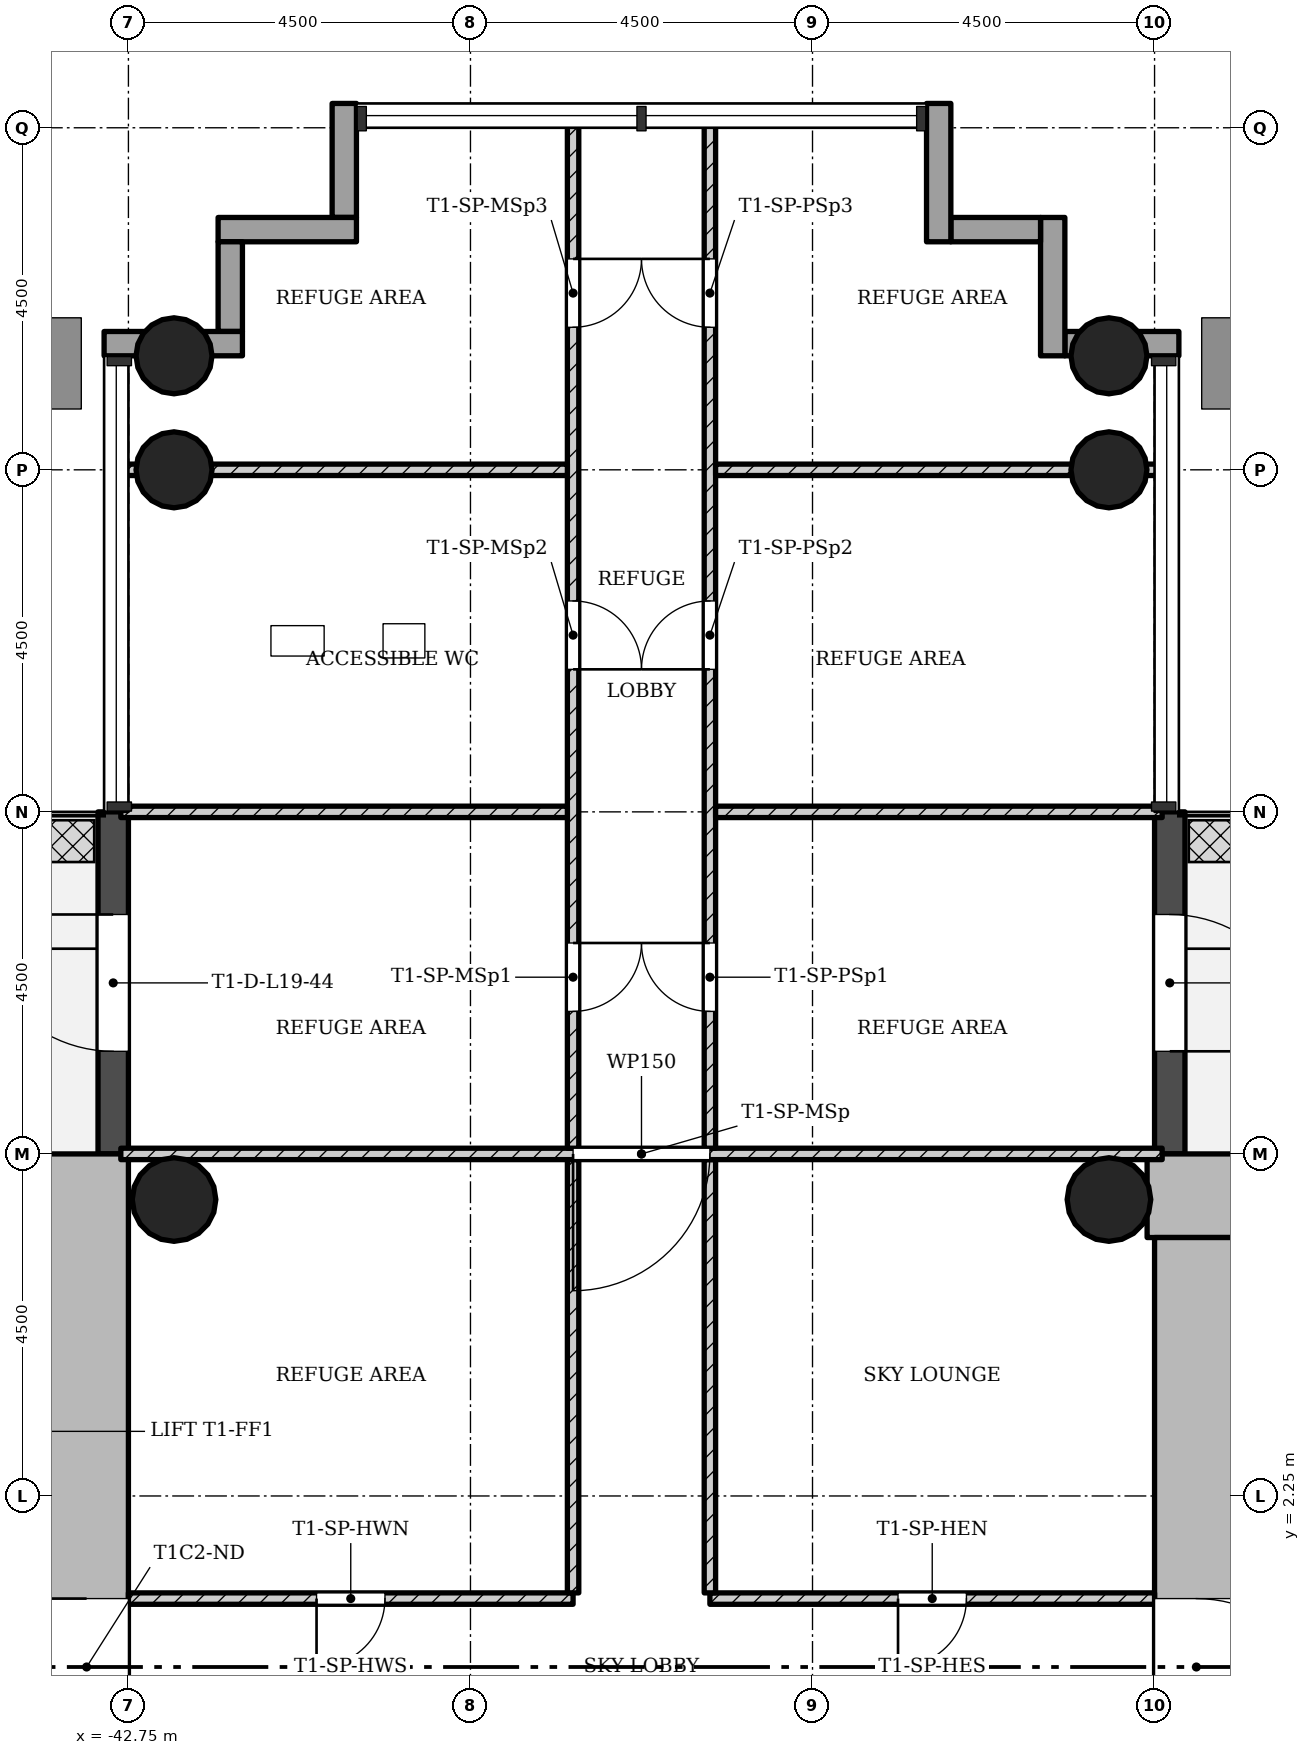
"""IFC4 building model, lengths in metres.
Left out: names, types, materials, properties, quantities, classifications, styles, units other than length and angle.
Written with IfcOpenShell. Run it as: python <this file> out.ifc"""

import sys

from ifc_helpers import new_model, si_unit, direction, frame, frame_2d, origin, origin_2d, place, context, subcontext, project, spatial, rectangle, hollow_circle, extrude, element, fill, save


model = new_model("IFC4")
c1 = context("Model", 3, precision=1e-05, world=origin(), true_north=direction((0.0, 1.0)))
c2 = subcontext(c1, "Body", "Model", "MODEL_VIEW")
j1 = project(units=[si_unit("LENGTHUNIT", "METRE"), si_unit("PLANEANGLEUNIT", "RADIAN")], contexts=[c1])
p1 = place(None, origin())
s1 = spatial("IfcSite", under=j1, at=p1, CompositionType="ELEMENT")
p2 = place(p1, origin())
s2 = spatial("IfcBuilding", under=s1, at=p2, CompositionType="ELEMENT")
p3 = place(p2, frame((0.0, 0.0, 72.1)))
s3 = spatial("IfcBuildingStorey", under=s2, at=p3, CompositionType="ELEMENT", Elevation=72.1)
p4 = place(p3, frame((-21.35, 6.2, 0.0), z_axis=(0.0, 0.0, 1.0), x_axis=(-1.0, 0.0, 0.0)))
e1 = element("IfcWall", 1, at=p4, inside=s3, PredefinedType="SHEAR", context=c2, shape_type="SweptSolid", body=[
    extrude(rectangle(XDim=7.998, YDim=1.1, at=frame_2d((3.999, 0.0))), origin(), (0.0, 0.0, 1.0), 4.5),
])
p5 = place(p3, frame((-28.7, 5.65, 0.0), z_axis=(0.0, 0.0, 1.0), x_axis=(0.0, -1.0, 0.0)))
e2 = element("IfcWall", 2, at=p5, inside=s3, PredefinedType="SHEAR", context=c2, shape_type="SweptSolid", body=[
    extrude(rectangle(XDim=12.4, YDim=1.1, at=frame_2d((6.2, 0.0))), origin(), (0.0, 0.0, 1.0), 4.5),
])
p6 = place(p5, frame((4.75, 0.0, 0.0)))
e3 = element("IfcOpeningElement", 3, at=p6, cuts=e2, PredefinedType="OPENING", context=c2, shape_type="SweptSolid", body=[
    extrude(rectangle(XDim=1.8, YDim=2.1, at=frame_2d((0.9, 1.05))), frame((0.0, 0.56, 0.0), z_axis=(0.0, -1.0, 0.0), x_axis=(1.0, 0.0, 0.0)), (0.0, 0.0, 1.0), 1.12),
])
p7 = place(p3, frame((-43.3, -5.65, 0.0), z_axis=(0.0, 0.0, 1.0), x_axis=(0.0, 1.0, 0.0)))
e4 = element("IfcWall", 4, at=p7, inside=s3, PredefinedType="SHEAR", context=c2, shape_type="SweptSolid", body=[
    extrude(rectangle(XDim=12.4, YDim=1.1, at=frame_2d((6.2, 0.0))), origin(), (0.0, 0.0, 1.0), 4.5),
])
p8 = place(p7, frame((4.75, 0.0, 0.0)))
e5 = element("IfcOpeningElement", 5, at=p8, cuts=e4, PredefinedType="OPENING", context=c2, shape_type="SweptSolid", body=[
    extrude(rectangle(XDim=1.8, YDim=2.1, at=frame_2d((0.9, 1.05))), frame((0.0, 0.56, 0.0), z_axis=(0.0, -1.0, 0.0), x_axis=(1.0, 0.0, 0.0)), (0.0, 0.0, 1.0), 1.12),
])
for number, where, z_axis, x_axis in (
    (6, (-29.85, 15.75, 0.0), (0.0, 0.0, 1.0), (1.0, 0.0, 0.0)),
    (7, (-42.15, 15.75, 0.0), (0.0, 0.0, 1.0), (1.0, 0.0, 0.0)),
    (8, (-29.85, 17.25, 0.0), (0.0, 0.0, 1.0), (1.0, 0.0, 0.0)),
    (9, (-42.15, 17.25, 0.0), (0.0, 0.0, 1.0), (1.0, 0.0, 0.0)),
):
    element("IfcColumn", number, at=place(p3, frame(where, z_axis=z_axis, x_axis=x_axis)), inside=s3, PredefinedType="COLUMN", context=c2, shape_type="SweptSolid", body=[
        extrude(hollow_circle(Radius=0.5, WallThickness=0.036, at=origin_2d()), origin(), (0.0, 0.0, 1.0), 4.5),
    ])
for number, where, z_axis, x_axis in (
    (10, (-29.85, 6.15, 0.0), (0.0, 0.0, 1.0), (1.0, 0.0, 0.0)),
    (11, (-42.15, 6.15, 0.0), (0.0, 0.0, 1.0), (1.0, 0.0, 0.0)),
):
    element("IfcColumn", number, at=place(p3, frame(where, z_axis=z_axis, x_axis=x_axis)), inside=s3, PredefinedType="COLUMN", context=c2, shape_type="SweptSolid", body=[
        extrude(hollow_circle(Radius=0.55, WallThickness=0.04, at=origin_2d()), origin(), (0.0, 0.0, 1.0), 4.5),
    ])
p9 = place(p3, frame((-29.05, 6.75, -0.02), z_axis=(0.0, 0.0, 1.0), x_axis=(0.0, 1.0, 0.0)))
e12 = element("IfcWall", 12, at=p9, inside=s3, PredefinedType="STANDARD", context=c2, shape_type="SweptSolid", body=[
    extrude(rectangle(XDim=4.5, YDim=0.4, at=frame_2d((2.25, 0.0))), origin(), (0.0, 0.0, 1.0), 4.22),
])
p10 = place(p9, frame((1.35, 0.0, 0.02)))
e13 = element("IfcOpeningElement", 13, at=p10, cuts=e12, PredefinedType="OPENING", context=c2, shape_type="SweptSolid", body=[
    extrude(rectangle(XDim=1.8, YDim=2.1, at=frame_2d((0.9, 1.05))), frame((0.0, 0.21, 0.0), z_axis=(0.0, -1.0, 0.0), x_axis=(1.0, 0.0, 0.0)), (0.0, 0.0, 1.0), 0.42),
])
p11 = place(p3, frame((-28.93, 17.41, -0.3), z_axis=(0.0, 0.0, 1.0), x_axis=(-1.0, 0.0, 0.0)))
e14 = element("IfcWall", 14, at=p11, inside=s3, PredefinedType="STANDARD", context=c2, shape_type="SweptSolid", body=[
    extrude(rectangle(XDim=1.5, YDim=0.32, at=frame_2d((0.75, 0.0))), origin(), (0.0, 0.0, 1.0), 4.5),
])
p12 = place(p3, frame((-30.59, 17.25, -0.3), z_axis=(0.0, 0.0, 1.0), x_axis=(0.0, 1.0, 0.0)))
e15 = element("IfcWall", 15, at=p12, inside=s3, PredefinedType="STANDARD", context=c2, shape_type="SweptSolid", body=[
    extrude(rectangle(XDim=1.82, YDim=0.32, at=frame_2d((0.91, 0.0))), origin(), (0.0, 0.0, 1.0), 4.5),
])
p13 = place(p3, frame((-30.75, 18.91, -0.3), z_axis=(0.0, 0.0, 1.0), x_axis=(-1.0, 0.0, 0.0)))
e16 = element("IfcWall", 16, at=p13, inside=s3, PredefinedType="STANDARD", context=c2, shape_type="SweptSolid", body=[
    extrude(rectangle(XDim=1.18, YDim=0.32, at=frame_2d((0.59, 0.0))), origin(), (0.0, 0.0, 1.0), 4.5),
])
p14 = place(p3, frame((-32.09, 18.75, -0.3), z_axis=(0.0, 0.0, 1.0), x_axis=(0.0, 1.0, 0.0)))
e17 = element("IfcWall", 17, at=p14, inside=s3, PredefinedType="STANDARD", context=c2, shape_type="SweptSolid", body=[
    extrude(rectangle(XDim=1.82, YDim=0.32, at=frame_2d((0.91, 0.0))), origin(), (0.0, 0.0, 1.0), 4.5),
])
p15 = place(p3, frame((-39.91, 20.57, -0.3), z_axis=(0.0, 0.0, 1.0), x_axis=(0.0, -1.0, 0.0)))
e18 = element("IfcWall", 18, at=p15, inside=s3, PredefinedType="STANDARD", context=c2, shape_type="SweptSolid", body=[
    extrude(rectangle(XDim=1.5, YDim=0.32, at=frame_2d((0.75, 0.0))), origin(), (0.0, 0.0, 1.0), 4.5),
])
p16 = place(p3, frame((-39.75, 18.91, -0.3), z_axis=(0.0, 0.0, 1.0), x_axis=(-1.0, 0.0, 0.0)))
e19 = element("IfcWall", 19, at=p16, inside=s3, PredefinedType="STANDARD", context=c2, shape_type="SweptSolid", body=[
    extrude(rectangle(XDim=1.82, YDim=0.32, at=frame_2d((0.91, 0.0))), origin(), (0.0, 0.0, 1.0), 4.5),
])
p17 = place(p3, frame((-41.41, 18.75, -0.3), z_axis=(0.0, 0.0, 1.0), x_axis=(0.0, -1.0, 0.0)))
e20 = element("IfcWall", 20, at=p17, inside=s3, PredefinedType="STANDARD", context=c2, shape_type="SweptSolid", body=[
    extrude(rectangle(XDim=1.18, YDim=0.32, at=frame_2d((0.59, 0.0))), origin(), (0.0, 0.0, 1.0), 4.5),
])
p18 = place(p3, frame((-41.25, 17.41, -0.3), z_axis=(0.0, 0.0, 1.0), x_axis=(-1.0, 0.0, 0.0)))
e21 = element("IfcWall", 21, at=p18, inside=s3, PredefinedType="STANDARD", context=c2, shape_type="SweptSolid", body=[
    extrude(rectangle(XDim=1.82, YDim=0.32, at=frame_2d((0.91, 0.0))), origin(), (0.0, 0.0, 1.0), 4.5),
])
p19 = place(p3, frame((-42.95, 11.25, -0.02), z_axis=(0.0, 0.0, 1.0), x_axis=(0.0, -1.0, 0.0)))
e22 = element("IfcWall", 22, at=p19, inside=s3, PredefinedType="STANDARD", context=c2, shape_type="SweptSolid", body=[
    extrude(rectangle(XDim=4.5, YDim=0.4, at=frame_2d((2.25, 0.0))), origin(), (0.0, 0.0, 1.0), 4.22),
])
p20 = place(p19, frame((1.35, 0.0, 0.02)))
e23 = element("IfcOpeningElement", 23, at=p20, cuts=e22, PredefinedType="OPENING", context=c2, shape_type="SweptSolid", body=[
    extrude(rectangle(XDim=1.8, YDim=2.1, at=frame_2d((0.9, 1.05))), frame((0.0, 0.21, 0.0), z_axis=(0.0, -1.0, 0.0), x_axis=(1.0, 0.0, 0.0)), (0.0, 0.0, 1.0), 0.42),
])
p21 = place(p3, frame((-35.1, 0.9, 0.0), z_axis=(0.0, 0.0, 1.0), x_axis=(1.0, 0.0, 0.0)))
e24 = element("IfcWall", 24, at=p21, inside=s3, PredefinedType="PARTITIONING", context=c2, shape_type="SweptSolid", body=[
    extrude(rectangle(XDim=5.85, YDim=0.15, at=frame_2d((2.925, 0.0))), origin(), (0.0, 0.0, 1.0), 4.08),
])
p22 = place(p21, frame((2.475, 0.0, 0.0)))
e25 = element("IfcOpeningElement", 25, at=p22, cuts=e24, PredefinedType="OPENING", context=c2, shape_type="SweptSolid", body=[
    extrude(rectangle(XDim=0.9, YDim=2.1, at=frame_2d((0.45, 1.05))), frame((0.0, 0.085, 0.0), z_axis=(0.0, -1.0, 0.0), x_axis=(1.0, 0.0, 0.0)), (0.0, 0.0, 1.0), 0.17),
])
p23 = place(p3, frame((-35.1, 0.975, 0.0), z_axis=(0.0, 0.0, 1.0), x_axis=(0.0, 1.0, 0.0)))
e26 = element("IfcWall", 26, at=p23, inside=s3, PredefinedType="PARTITIONING", context=c2, shape_type="SweptSolid", body=[
    extrude(rectangle(XDim=5.7, YDim=0.15, at=frame_2d((2.85, 0.0))), origin(), (0.0, 0.0, 1.0), 4.08),
])
p24 = place(p3, frame((-42.75, 0.9, 0.0), z_axis=(0.0, 0.0, 1.0), x_axis=(1.0, 0.0, 0.0)))
e27 = element("IfcWall", 27, at=p24, inside=s3, PredefinedType="PARTITIONING", context=c2, shape_type="SweptSolid", body=[
    extrude(rectangle(XDim=5.85, YDim=0.15, at=frame_2d((2.925, 0.0))), origin(), (0.0, 0.0, 1.0), 4.08),
])
p25 = place(p24, frame((2.475, 0.0, 0.0)))
e28 = element("IfcOpeningElement", 28, at=p25, cuts=e27, PredefinedType="OPENING", context=c2, shape_type="SweptSolid", body=[
    extrude(rectangle(XDim=0.9, YDim=2.1, at=frame_2d((0.45, 1.05))), frame((0.0, 0.085, 0.0), z_axis=(0.0, -1.0, 0.0), x_axis=(1.0, 0.0, 0.0)), (0.0, 0.0, 1.0), 0.17),
])
p26 = place(p3, frame((-36.9, 0.975, 0.0), z_axis=(0.0, 0.0, 1.0), x_axis=(0.0, 1.0, 0.0)))
e29 = element("IfcWall", 29, at=p26, inside=s3, PredefinedType="PARTITIONING", context=c2, shape_type="SweptSolid", body=[
    extrude(rectangle(XDim=5.7, YDim=0.15, at=frame_2d((2.85, 0.0))), origin(), (0.0, 0.0, 1.0), 4.08),
])
p27 = place(p3, frame((-42.85, 6.75, 0.0), z_axis=(0.0, 0.0, 1.0), x_axis=(1.0, 0.0, 0.0)))
e30 = element("IfcWall", 30, at=p27, inside=s3, PredefinedType="PARTITIONING", context=c2, shape_type="SweptSolid", body=[
    extrude(rectangle(XDim=13.7, YDim=0.15, at=frame_2d((6.85, 0.0))), origin(), (0.0, 0.0, 1.0), 4.08),
])
p28 = place(p27, frame((5.95, 0.0, 0.0)))
e31 = element("IfcOpeningElement", 31, at=p28, cuts=e30, PredefinedType="OPENING", context=c2, shape_type="SweptSolid", body=[
    extrude(rectangle(XDim=1.8, YDim=2.1, at=frame_2d((0.9, 1.05))), frame((0.0, 0.085, 0.0), z_axis=(0.0, -1.0, 0.0), x_axis=(1.0, 0.0, 0.0)), (0.0, 0.0, 1.0), 0.17),
])
p29 = place(p3, frame((-35.1, 6.825, 0.0), z_axis=(0.0, 0.0, 1.0), x_axis=(0.0, 1.0, 0.0)))
e32 = element("IfcWall", 32, at=p29, inside=s3, PredefinedType="PARTITIONING", context=c2, shape_type="SweptSolid", body=[
    extrude(rectangle(XDim=13.525, YDim=0.15, at=frame_2d((6.763, 0.0))), origin(), (0.0, 0.0, 1.0), 4.08),
])
p30 = place(p29, frame((1.8, 0.0, 0.0)))
e33 = element("IfcOpeningElement", 33, at=p30, cuts=e32, PredefinedType="OPENING", context=c2, shape_type="SweptSolid", body=[
    extrude(rectangle(XDim=0.9, YDim=2.1, at=frame_2d((0.45, 1.05))), frame((0.0, 0.085, 0.0), z_axis=(0.0, -1.0, 0.0), x_axis=(1.0, 0.0, 0.0)), (0.0, 0.0, 1.0), 0.17),
])
p31 = place(p29, frame((6.3, 0.0, 0.0)))
e34 = element("IfcOpeningElement", 34, at=p31, cuts=e32, PredefinedType="OPENING", context=c2, shape_type="SweptSolid", body=[
    extrude(rectangle(XDim=0.9, YDim=2.1, at=frame_2d((0.45, 1.05))), frame((0.0, 0.085, 0.0), z_axis=(0.0, -1.0, 0.0), x_axis=(1.0, 0.0, 0.0)), (0.0, 0.0, 1.0), 0.17),
])
p32 = place(p29, frame((10.8, 0.0, 0.0)))
e35 = element("IfcOpeningElement", 35, at=p32, cuts=e32, PredefinedType="OPENING", context=c2, shape_type="SweptSolid", body=[
    extrude(rectangle(XDim=0.9, YDim=2.1, at=frame_2d((0.45, 1.05))), frame((0.0, 0.085, 0.0), z_axis=(0.0, -1.0, 0.0), x_axis=(1.0, 0.0, 0.0)), (0.0, 0.0, 1.0), 0.17),
])
for number, where, z_axis, x_axis in (
    (36, (-35.025, 11.25, 0.0), (0.0, 0.0, 1.0), (1.0, 0.0, 0.0)),
    (37, (-35.025, 15.75, 0.0), (0.0, 0.0, 1.0), (1.0, 0.0, 0.0)),
):
    element("IfcWall", number, at=place(p3, frame(where, z_axis=z_axis, x_axis=x_axis)), inside=s3, PredefinedType="PARTITIONING", context=c2, shape_type="SweptSolid", body=[
        extrude(rectangle(XDim=5.875, YDim=0.15, at=frame_2d((2.938, 0.0))), origin(), (0.0, 0.0, 1.0), 4.08),
    ])
p33 = place(p3, frame((-36.9, 6.825, 0.0), z_axis=(0.0, 0.0, 1.0), x_axis=(0.0, 1.0, 0.0)))
e38 = element("IfcWall", 38, at=p33, inside=s3, PredefinedType="PARTITIONING", context=c2, shape_type="SweptSolid", body=[
    extrude(rectangle(XDim=13.525, YDim=0.15, at=frame_2d((6.763, 0.0))), origin(), (0.0, 0.0, 1.0), 4.08),
])
p34 = place(p33, frame((1.8, 0.0, 0.0)))
e39 = element("IfcOpeningElement", 39, at=p34, cuts=e38, PredefinedType="OPENING", context=c2, shape_type="SweptSolid", body=[
    extrude(rectangle(XDim=0.9, YDim=2.1, at=frame_2d((0.45, 1.05))), frame((0.0, 0.085, 0.0), z_axis=(0.0, -1.0, 0.0), x_axis=(1.0, 0.0, 0.0)), (0.0, 0.0, 1.0), 0.17),
])
p35 = place(p33, frame((6.3, 0.0, 0.0)))
e40 = element("IfcOpeningElement", 40, at=p35, cuts=e38, PredefinedType="OPENING", context=c2, shape_type="SweptSolid", body=[
    extrude(rectangle(XDim=0.9, YDim=2.1, at=frame_2d((0.45, 1.05))), frame((0.0, 0.085, 0.0), z_axis=(0.0, -1.0, 0.0), x_axis=(1.0, 0.0, 0.0)), (0.0, 0.0, 1.0), 0.17),
])
p36 = place(p33, frame((10.8, 0.0, 0.0)))
e41 = element("IfcOpeningElement", 41, at=p36, cuts=e38, PredefinedType="OPENING", context=c2, shape_type="SweptSolid", body=[
    extrude(rectangle(XDim=0.9, YDim=2.1, at=frame_2d((0.45, 1.05))), frame((0.0, 0.085, 0.0), z_axis=(0.0, -1.0, 0.0), x_axis=(1.0, 0.0, 0.0)), (0.0, 0.0, 1.0), 0.17),
])
for number, where, z_axis, x_axis in (
    (42, (-36.975, 11.25, 0.0), (0.0, 0.0, 1.0), (-1.0, 0.0, 0.0)),
    (43, (-36.975, 15.75, 0.0), (0.0, 0.0, 1.0), (-1.0, 0.0, 0.0)),
):
    element("IfcWall", number, at=place(p3, frame(where, z_axis=z_axis, x_axis=x_axis)), inside=s3, PredefinedType="PARTITIONING", context=c2, shape_type="SweptSolid", body=[
        extrude(rectangle(XDim=5.875, YDim=0.15, at=frame_2d((2.938, 0.0))), origin(), (0.0, 0.0, 1.0), 4.08),
    ])
p37 = place(p10, origin())
e44 = element("IfcDoor", 44, at=p37, inside=s3, OperationType="SINGLE_SWING_LEFT", PredefinedType="DOOR", context=c2, shape_type="SweptSolid", body=[
    extrude(rectangle(XDim=1.8, YDim=2.1, at=frame_2d((0.9, 1.05))), frame((0.0, 0.025, 0.0), z_axis=(0.0, -1.0, 0.0), x_axis=(1.0, 0.0, 0.0)), (0.0, 0.0, 1.0), 0.05),
])
fill(e13, e44)
p38 = place(p20, origin())
e45 = element("IfcDoor", 45, at=p38, inside=s3, OperationType="SINGLE_SWING_LEFT", PredefinedType="DOOR", context=c2, shape_type="SweptSolid", body=[
    extrude(rectangle(XDim=1.8, YDim=2.1, at=frame_2d((0.9, 1.05))), frame((0.0, 0.025, 0.0), z_axis=(0.0, -1.0, 0.0), x_axis=(1.0, 0.0, 0.0)), (0.0, 0.0, 1.0), 0.05),
])
fill(e23, e45)
p39 = place(p22, origin())
e46 = element("IfcDoor", 46, at=p39, inside=s3, OperationType="SINGLE_SWING_LEFT", PredefinedType="DOOR", context=c2, shape_type="SweptSolid", body=[
    extrude(rectangle(XDim=0.9, YDim=2.1, at=frame_2d((0.45, 1.05))), frame((0.0, 0.025, 0.0), z_axis=(0.0, -1.0, 0.0), x_axis=(1.0, 0.0, 0.0)), (0.0, 0.0, 1.0), 0.05),
])
fill(e25, e46)
p40 = place(p25, origin())
e47 = element("IfcDoor", 47, at=p40, inside=s3, OperationType="SINGLE_SWING_LEFT", PredefinedType="DOOR", context=c2, shape_type="SweptSolid", body=[
    extrude(rectangle(XDim=0.9, YDim=2.1, at=frame_2d((0.45, 1.05))), frame((0.0, 0.025, 0.0), z_axis=(0.0, -1.0, 0.0), x_axis=(1.0, 0.0, 0.0)), (0.0, 0.0, 1.0), 0.05),
])
fill(e28, e47)
p41 = place(p28, origin())
e48 = element("IfcDoor", 48, at=p41, inside=s3, OperationType="SINGLE_SWING_LEFT", PredefinedType="DOOR", context=c2, shape_type="SweptSolid", body=[
    extrude(rectangle(XDim=1.8, YDim=2.1, at=frame_2d((0.9, 1.05))), frame((0.0, 0.025, 0.0), z_axis=(0.0, -1.0, 0.0), x_axis=(1.0, 0.0, 0.0)), (0.0, 0.0, 1.0), 0.05),
])
fill(e31, e48)
p42 = place(p30, origin())
e49 = element("IfcDoor", 49, at=p42, inside=s3, OperationType="SINGLE_SWING_LEFT", PredefinedType="DOOR", context=c2, shape_type="SweptSolid", body=[
    extrude(rectangle(XDim=0.9, YDim=2.1, at=frame_2d((0.45, 1.05))), frame((0.0, 0.025, 0.0), z_axis=(0.0, -1.0, 0.0), x_axis=(1.0, 0.0, 0.0)), (0.0, 0.0, 1.0), 0.05),
])
fill(e33, e49)
p43 = place(p31, origin())
e50 = element("IfcDoor", 50, at=p43, inside=s3, OperationType="SINGLE_SWING_RIGHT", PredefinedType="DOOR", context=c2, shape_type="SweptSolid", body=[
    extrude(rectangle(XDim=0.9, YDim=2.1, at=frame_2d((0.45, 1.05))), frame((0.0, 0.025, 0.0), z_axis=(0.0, -1.0, 0.0), x_axis=(1.0, 0.0, 0.0)), (0.0, 0.0, 1.0), 0.05),
])
fill(e34, e50)
p44 = place(p32, origin())
e51 = element("IfcDoor", 51, at=p44, inside=s3, OperationType="SINGLE_SWING_LEFT", PredefinedType="DOOR", context=c2, shape_type="SweptSolid", body=[
    extrude(rectangle(XDim=0.9, YDim=2.1, at=frame_2d((0.45, 1.05))), frame((0.0, 0.025, 0.0), z_axis=(0.0, -1.0, 0.0), x_axis=(1.0, 0.0, 0.0)), (0.0, 0.0, 1.0), 0.05),
])
fill(e35, e51)
p45 = place(p34, origin())
e52 = element("IfcDoor", 52, at=p45, inside=s3, OperationType="SINGLE_SWING_RIGHT", PredefinedType="DOOR", context=c2, shape_type="SweptSolid", body=[
    extrude(rectangle(XDim=0.9, YDim=2.1, at=frame_2d((0.45, 1.05))), frame((0.0, 0.025, 0.0), z_axis=(0.0, -1.0, 0.0), x_axis=(1.0, 0.0, 0.0)), (0.0, 0.0, 1.0), 0.05),
])
fill(e39, e52)
p46 = place(p35, origin())
e53 = element("IfcDoor", 53, at=p46, inside=s3, OperationType="SINGLE_SWING_LEFT", PredefinedType="DOOR", context=c2, shape_type="SweptSolid", body=[
    extrude(rectangle(XDim=0.9, YDim=2.1, at=frame_2d((0.45, 1.05))), frame((0.0, 0.025, 0.0), z_axis=(0.0, -1.0, 0.0), x_axis=(1.0, 0.0, 0.0)), (0.0, 0.0, 1.0), 0.05),
])
fill(e40, e53)
p47 = place(p36, origin())
e54 = element("IfcDoor", 54, at=p47, inside=s3, OperationType="SINGLE_SWING_RIGHT", PredefinedType="DOOR", context=c2, shape_type="SweptSolid", body=[
    extrude(rectangle(XDim=0.9, YDim=2.1, at=frame_2d((0.45, 1.05))), frame((0.0, 0.025, 0.0), z_axis=(0.0, -1.0, 0.0), x_axis=(1.0, 0.0, 0.0)), (0.0, 0.0, 1.0), 0.05),
])
fill(e41, e54)
p48 = place(p6, origin())
e55 = element("IfcDoor", 55, at=p48, inside=s3, OperationType="SINGLE_SWING_LEFT", PredefinedType="DOOR", context=c2, shape_type="SweptSolid", body=[
    extrude(rectangle(XDim=1.8, YDim=2.1, at=frame_2d((0.9, 1.05))), frame((0.0, 0.025, 0.0), z_axis=(0.0, -1.0, 0.0), x_axis=(1.0, 0.0, 0.0)), (0.0, 0.0, 1.0), 0.05),
])
fill(e3, e55)
p49 = place(p8, origin())
e56 = element("IfcDoor", 56, at=p49, inside=s3, OperationType="SINGLE_SWING_LEFT", PredefinedType="DOOR", context=c2, shape_type="SweptSolid", body=[
    extrude(rectangle(XDim=1.8, YDim=2.1, at=frame_2d((0.9, 1.05))), frame((0.0, 0.025, 0.0), z_axis=(0.0, -1.0, 0.0), x_axis=(1.0, 0.0, 0.0)), (0.0, 0.0, 1.0), 0.05),
])
fill(e5, e56)
save(model, sys.argv[1])
